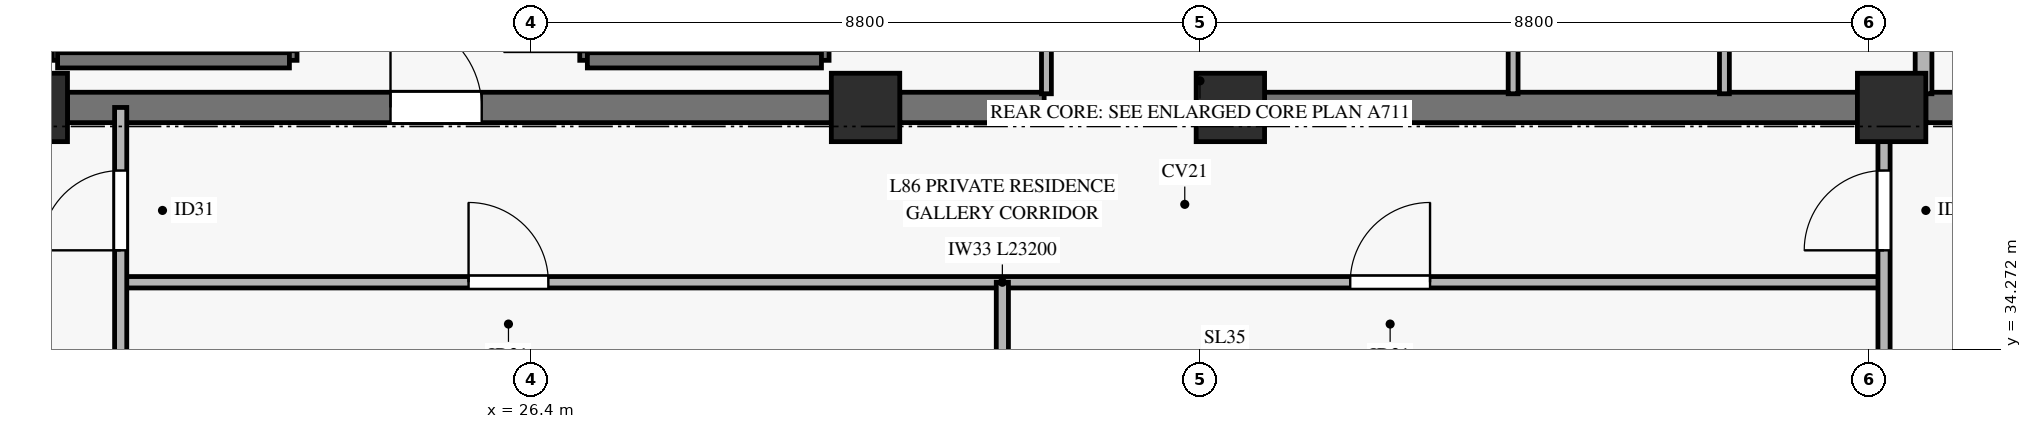
"""IFC4 building model, lengths in metres.
Left out: names, types, materials, properties, quantities, classifications, styles, units other than length and angle.
Written with IfcOpenShell. Run it as: python <this file> out.ifc"""

import sys

from ifc_helpers import new_model, si_unit, direction, frame, frame_2d, origin, origin_2d, place, context, subcontext, project, spatial, rectangle, extrude, source, transform, mapped, element, fill, save


model = new_model("IFC4")
c1 = context("Model", 3, precision=1e-05, world=origin(), true_north=direction((0.0, 1.0)))
c2 = subcontext(c1, "Body", "Model", "MODEL_VIEW")
j1 = project(units=[si_unit("LENGTHUNIT", "METRE"), si_unit("PLANEANGLEUNIT", "RADIAN")], contexts=[c1])
p1 = place(None, origin())
s1 = spatial("IfcSite", under=j1, at=p1, CompositionType="ELEMENT")
p2 = place(p1, origin())
s2 = spatial("IfcBuilding", under=s1, at=p2, CompositionType="ELEMENT")
p3 = place(p2, frame((0.0, 0.0, 332.3)))
s3 = spatial("IfcBuildingStorey", under=s2, at=p3, CompositionType="ELEMENT", Elevation=332.3)
m1 = source(origin(), c2, "Body", "SweptSolid", [
    extrude(rectangle(XDim=0.9, YDim=0.9, at=origin_2d()), origin(), (0.0, 0.0, 1.0), 3.185),
])
for number, where, z_axis, x_axis in (
    (1, (19.85, 37.45, 0.0), (0.0, 0.0, 1.0), (1.0, 0.0, 0.0)),
    (2, (30.8, 37.45, 0.0), (0.0, 0.0, 1.0), (1.0, 0.0, 0.0)),
    (3, (35.6, 37.45, 0.0), (0.0, 0.0, 1.0), (1.0, 0.0, 0.0)),
    (4, (44.3, 37.45, 0.0), (0.0, 0.0, 1.0), (1.0, 0.0, 0.0)),
):
    element("IfcColumn", number, at=place(p3, frame(where, z_axis=z_axis, x_axis=x_axis)), inside=s3, PredefinedType="PILASTER", context=c2, shape_type="MappedRepresentation", body=[
        mapped(m1, transform((0.0, 0.0, 0.0), x_axis=(1.0, 0.0, 0.0), y_axis=(0.0, 1.0, 0.0), z_axis=(0.0, 0.0, 1.0), scale=1.0)),
    ])
p4 = place(p3, frame((20.3, 37.45, 0.0), z_axis=(0.0, 0.0, 1.0), x_axis=(1.0, 0.0, 0.0)))
e5 = element("IfcWall", 5, at=p4, inside=s3, PredefinedType="SHEAR", context=c2, shape_type="SweptSolid", body=[
    extrude(rectangle(XDim=10.05, YDim=0.4, at=frame_2d((5.025, 0.0))), origin(), (0.0, 0.0, 1.0), 3.185),
])
p5 = place(p4, frame((4.25, 0.0, 0.0)))
e6 = element("IfcOpeningElement", 6, at=p5, cuts=e5, PredefinedType="OPENING", context=c2, shape_type="SweptSolid", body=[
    extrude(rectangle(XDim=1.2, YDim=2.15, at=frame_2d((0.6, 1.075))), frame((0.0, 0.21, 0.0), z_axis=(0.0, -1.0, 0.0), x_axis=(1.0, 0.0, 0.0)), (0.0, 0.0, 1.0), 0.42),
])
p6 = place(p3, frame((31.25, 37.45, 0.0), z_axis=(0.0, 0.0, 1.0), x_axis=(1.0, 0.0, 0.0)))
e7 = element("IfcWall", 7, at=p6, inside=s3, PredefinedType="SHEAR", context=c2, shape_type="SweptSolid", body=[
    extrude(rectangle(XDim=1.9, YDim=0.4, at=frame_2d((0.95, 0.0))), origin(), (0.0, 0.0, 1.0), 3.185),
])
p7 = place(p3, frame((36.05, 37.45, 0.0), z_axis=(0.0, 0.0, 1.0), x_axis=(1.0, 0.0, 0.0)))
e8 = element("IfcWall", 8, at=p7, inside=s3, PredefinedType="SHEAR", context=c2, shape_type="SweptSolid", body=[
    extrude(rectangle(XDim=7.8, YDim=0.4, at=frame_2d((3.9, 0.0))), origin(), (0.0, 0.0, 1.0), 3.185),
])
p8 = place(p3, frame((44.75, 37.45, 0.0), z_axis=(0.0, 0.0, 1.0), x_axis=(1.0, 0.0, 0.0)))
e9 = element("IfcWall", 9, at=p8, inside=s3, PredefinedType="SHEAR", context=c2, shape_type="SweptSolid", body=[
    extrude(rectangle(XDim=5.35, YDim=0.4, at=frame_2d((2.675, 0.0))), origin(), (0.0, 0.0, 1.0), 3.185),
])
p9 = place(p8, frame((0.7, 0.0, 0.0)))
e10 = element("IfcOpeningElement", 10, at=p9, cuts=e9, PredefinedType="OPENING", context=c2, shape_type="SweptSolid", body=[
    extrude(rectangle(XDim=1.2, YDim=2.15, at=frame_2d((0.6, 1.075))), frame((0.0, 0.21, 0.0), z_axis=(0.0, -1.0, 0.0), x_axis=(1.0, 0.0, 0.0)), (0.0, 0.0, 1.0), 0.42),
])
p10 = place(p3, frame((20.17, 38.07, 0.0), z_axis=(0.0, 0.0, 1.0), x_axis=(0.0, 1.0, 0.0)))
e11 = element("IfcWall", 11, at=p10, inside=s3, PredefinedType="SOLIDWALL", context=c2, shape_type="SweptSolid", body=[
    extrude(rectangle(XDim=7.25, YDim=0.14, at=frame_2d((3.625, 0.0))), origin(), (0.0, 0.0, 1.0), 3.4),
])
p11 = place(p3, frame((23.22, 38.07, 0.0), z_axis=(0.0, 0.0, 1.0), x_axis=(0.0, 1.0, 0.0)))
e12 = element("IfcWall", 12, at=p11, inside=s3, PredefinedType="SOLIDWALL", context=c2, shape_type="SweptSolid", body=[
    extrude(rectangle(XDim=7.25, YDim=0.2, at=frame_2d((3.625, 0.0))), origin(), (0.0, 0.0, 1.0), 3.4),
])
p12 = place(p11, frame((0.11, 0.0, 0.0)))
e13 = element("IfcOpeningElement", 13, at=p12, cuts=e12, PredefinedType="OPENING", context=c2, shape_type="SweptSolid", body=[
    extrude(rectangle(XDim=1.1, YDim=2.15, at=frame_2d((0.55, 1.075))), frame((0.0, 0.11, 0.0), z_axis=(0.0, -1.0, 0.0), x_axis=(1.0, 0.0, 0.0)), (0.0, 0.0, 1.0), 0.22),
])
p13 = place(p3, frame((20.17, 38.07, 0.0), z_axis=(0.0, 0.0, 1.0), x_axis=(1.0, 0.0, 0.0)))
e14 = element("IfcWall", 14, at=p13, inside=s3, PredefinedType="SOLIDWALL", context=c2, shape_type="SweptSolid", body=[
    extrude(rectangle(XDim=3.05, YDim=0.2, at=frame_2d((1.525, 0.0))), origin(), (0.0, 0.0, 1.0), 3.4),
])
p14 = place(p3, frame((27.14, 38.07, 0.0), z_axis=(0.0, 0.0, 1.0), x_axis=(0.0, 1.0, 0.0)))
e15 = element("IfcWall", 15, at=p14, inside=s3, PredefinedType="SOLIDWALL", context=c2, shape_type="SweptSolid", body=[
    extrude(rectangle(XDim=7.25, YDim=0.2, at=frame_2d((3.625, 0.0))), origin(), (0.0, 0.0, 1.0), 3.4),
])
p15 = place(p14, frame((0.11, 0.0, 0.0)))
e16 = element("IfcOpeningElement", 16, at=p15, cuts=e15, PredefinedType="OPENING", context=c2, shape_type="SweptSolid", body=[
    extrude(rectangle(XDim=1.1, YDim=2.15, at=frame_2d((0.55, 1.075))), frame((0.0, 0.11, 0.0), z_axis=(0.0, -1.0, 0.0), x_axis=(1.0, 0.0, 0.0)), (0.0, 0.0, 1.0), 0.22),
])
p16 = place(p3, frame((30.22, 38.07, 0.0), z_axis=(0.0, 0.0, 1.0), x_axis=(0.0, 1.0, 0.0)))
e17 = element("IfcWall", 17, at=p16, inside=s3, PredefinedType="SOLIDWALL", context=c2, shape_type="SweptSolid", body=[
    extrude(rectangle(XDim=7.25, YDim=0.2, at=frame_2d((3.625, 0.0))), origin(), (0.0, 0.0, 1.0), 3.4),
])
p17 = place(p3, frame((27.14, 38.07, 0.0), z_axis=(0.0, 0.0, 1.0), x_axis=(1.0, 0.0, 0.0)))
e18 = element("IfcWall", 18, at=p17, inside=s3, PredefinedType="SOLIDWALL", context=c2, shape_type="SweptSolid", body=[
    extrude(rectangle(XDim=3.08, YDim=0.2, at=frame_2d((1.54, 0.0))), origin(), (0.0, 0.0, 1.0), 3.4),
])
p18 = place(p3, frame((44.72, 37.63, 0.0), z_axis=(0.0, 0.0, 1.0), x_axis=(0.0, 1.0, 0.0)))
e19 = element("IfcWall", 19, at=p18, inside=s3, PredefinedType="SOLIDWALL", context=c2, shape_type="SweptSolid", body=[
    extrude(rectangle(XDim=7.59, YDim=0.22, at=frame_2d((3.795, 0.0))), origin(), (0.0, 0.0, 1.0), 3.185),
])
p19 = place(p3, frame((33.18, 37.63, 0.0), z_axis=(0.0, 0.0, 1.0), x_axis=(0.0, 1.0, 0.0)))
e20 = element("IfcWall", 20, at=p19, inside=s3, PredefinedType="PARTITIONING", context=c2, shape_type="SweptSolid", body=[
    extrude(rectangle(XDim=6.52, YDim=0.13, at=frame_2d((3.26, 0.0))), origin(), (0.0, 0.0, 1.0), 2.27),
])
p20 = place(p19, frame((2.27, 0.0, 0.0)))
e21 = element("IfcOpeningElement", 21, at=p20, cuts=e20, PredefinedType="OPENING", context=c2, shape_type="SweptSolid", body=[
    extrude(rectangle(XDim=0.9, YDim=2.1, at=frame_2d((0.45, 1.05))), frame((0.0, 0.075, 0.0), z_axis=(0.0, -1.0, 0.0), x_axis=(1.0, 0.0, 0.0)), (0.0, 0.0, 1.0), 0.15),
])
p21 = place(p3, frame((39.32, 37.63, 0.0), z_axis=(0.0, 0.0, 1.0), x_axis=(0.0, 1.0, 0.0)))
e22 = element("IfcWall", 22, at=p21, inside=s3, PredefinedType="PARTITIONING", context=c2, shape_type="SweptSolid", body=[
    extrude(rectangle(XDim=8.74, YDim=0.13, at=frame_2d((4.37, 0.0))), origin(), (0.0, 0.0, 1.0), 3.185),
])
p22 = place(p21, frame((4.89, 0.0, 0.0)))
e23 = element("IfcOpeningElement", 23, at=p22, cuts=e22, PredefinedType="OPENING", context=c2, shape_type="SweptSolid", body=[
    extrude(rectangle(XDim=0.9, YDim=2.1, at=frame_2d((0.45, 1.05))), frame((0.0, 0.075, 0.0), z_axis=(0.0, -1.0, 0.0), x_axis=(1.0, 0.0, 0.0)), (0.0, 0.0, 1.0), 0.15),
])
p23 = place(p3, frame((42.1, 37.63, 0.0), z_axis=(0.0, 0.0, 1.0), x_axis=(0.0, 1.0, 0.0)))
e24 = element("IfcWall", 24, at=p23, inside=s3, PredefinedType="PARTITIONING", context=c2, shape_type="SweptSolid", body=[
    extrude(rectangle(XDim=8.74, YDim=0.13, at=frame_2d((4.37, 0.0))), origin(), (0.0, 0.0, 1.0), 3.185),
])
p24 = place(p23, frame((2.17, 0.0, 0.0)))
e25 = element("IfcOpeningElement", 25, at=p24, cuts=e24, PredefinedType="OPENING", context=c2, shape_type="SweptSolid", body=[
    extrude(rectangle(XDim=0.9, YDim=2.1, at=frame_2d((0.45, 1.05))), frame((0.0, 0.075, 0.0), z_axis=(0.0, -1.0, 0.0), x_axis=(1.0, 0.0, 0.0)), (0.0, 0.0, 1.0), 0.15),
])
p25 = place(p3, frame((21.0, 35.15, 0.0), z_axis=(0.0, 0.0, 1.0), x_axis=(1.0, 0.0, 0.0)))
e26 = element("IfcWall", 26, at=p25, inside=s3, PredefinedType="PARTITIONING", context=c2, shape_type="SweptSolid", body=[
    extrude(rectangle(XDim=23.2, YDim=0.15, at=frame_2d((11.6, 0.0))), origin(), (0.0, 0.0, 1.0), 2.47),
])
p26 = place(p25, frame((4.577, 0.0, 0.0)))
e27 = element("IfcOpeningElement", 27, at=p26, cuts=e26, PredefinedType="OPENING", context=c2, shape_type="SweptSolid", body=[
    extrude(rectangle(XDim=1.05, YDim=2.15, at=frame_2d((0.525, 1.075))), frame((0.0, 0.085, 0.0), z_axis=(0.0, -1.0, 0.0), x_axis=(1.0, 0.0, 0.0)), (0.0, 0.0, 1.0), 0.17),
])
p27 = place(p25, frame((16.177, 0.0, 0.0)))
e28 = element("IfcOpeningElement", 28, at=p27, cuts=e26, PredefinedType="OPENING", context=c2, shape_type="SweptSolid", body=[
    extrude(rectangle(XDim=1.05, YDim=2.15, at=frame_2d((0.525, 1.075))), frame((0.0, 0.085, 0.0), z_axis=(0.0, -1.0, 0.0), x_axis=(1.0, 0.0, 0.0)), (0.0, 0.0, 1.0), 0.17),
])
p28 = place(p3, frame((21.0, 21.636, 0.0), z_axis=(0.0, 0.0, 1.0), x_axis=(0.0, 1.0, 0.0)))
e29 = element("IfcWall", 29, at=p28, inside=s3, PredefinedType="PARTITIONING", context=c2, shape_type="SweptSolid", body=[
    extrude(rectangle(XDim=15.814, YDim=0.16, at=frame_2d((7.907, 0.0))), origin(), (0.0, 0.0, 1.0), 2.77),
])
p29 = place(p28, frame((13.934, 0.0, 0.0)))
e30 = element("IfcOpeningElement", 30, at=p29, cuts=e29, PredefinedType="OPENING", context=c2, shape_type="SweptSolid", body=[
    extrude(rectangle(XDim=1.05, YDim=2.15, at=frame_2d((0.525, 1.075))), frame((0.0, 0.09, 0.0), z_axis=(0.0, -1.0, 0.0), x_axis=(1.0, 0.0, 0.0)), (0.0, 0.0, 1.0), 0.18),
])
p30 = place(p3, frame((32.6, 21.636, 0.0), z_axis=(0.0, 0.0, 1.0), x_axis=(0.0, 1.0, 0.0)))
e31 = element("IfcWall", 31, at=p30, inside=s3, PredefinedType="PARTITIONING", context=c2, shape_type="SweptSolid", body=[
    extrude(rectangle(XDim=13.514, YDim=0.16, at=frame_2d((6.757, 0.0))), origin(), (0.0, 0.0, 1.0), 2.77),
])
p31 = place(p3, frame((44.2, 21.636, 0.0), z_axis=(0.0, 0.0, 1.0), x_axis=(0.0, 1.0, 0.0)))
e32 = element("IfcWall", 32, at=p31, inside=s3, PredefinedType="PARTITIONING", context=c2, shape_type="SweptSolid", body=[
    extrude(rectangle(XDim=15.814, YDim=0.16, at=frame_2d((7.907, 0.0))), origin(), (0.0, 0.0, 1.0), 2.47),
])
p32 = place(p31, frame((13.934, 0.0, 0.0)))
e33 = element("IfcOpeningElement", 33, at=p32, cuts=e32, PredefinedType="OPENING", context=c2, shape_type="SweptSolid", body=[
    extrude(rectangle(XDim=1.05, YDim=2.15, at=frame_2d((0.525, 1.075))), frame((0.0, 0.09, 0.0), z_axis=(0.0, -1.0, 0.0), x_axis=(1.0, 0.0, 0.0)), (0.0, 0.0, 1.0), 0.18),
])
m2 = source(origin(), c2, "Body", "SweptSolid", [
    extrude(rectangle(XDim=1.2, YDim=2.15, at=frame_2d((0.6, 1.075))), frame((0.0, 0.025, 0.0), z_axis=(0.0, -1.0, 0.0), x_axis=(1.0, 0.0, 0.0)), (0.0, 0.0, 1.0), 0.05),
])
p33 = place(p5, origin())
e34 = element("IfcDoor", 34, at=p33, inside=s3, OperationType="SINGLE_SWING_LEFT", PredefinedType="DOOR", context=c2, shape_type="MappedRepresentation", body=[
    mapped(m2, transform((0.0, 0.0, 0.0), x_axis=(1.0, 0.0, 0.0), y_axis=(0.0, 1.0, 0.0), z_axis=(0.0, 0.0, 1.0), scale=1.0)),
])
fill(e6, e34)
m3 = source(origin(), c2, "Body", "SweptSolid", [
    extrude(rectangle(XDim=1.05, YDim=2.15, at=frame_2d((0.525, 1.075))), frame((0.0, 0.025, 0.0), z_axis=(0.0, -1.0, 0.0), x_axis=(1.0, 0.0, 0.0)), (0.0, 0.0, 1.0), 0.05),
])
p34 = place(p29, origin())
e35 = element("IfcDoor", 35, at=p34, inside=s3, OperationType="SINGLE_SWING_LEFT", PredefinedType="DOOR", context=c2, shape_type="MappedRepresentation", body=[
    mapped(m3, transform((0.0, 0.0, 0.0), x_axis=(1.0, 0.0, 0.0), y_axis=(0.0, 1.0, 0.0), z_axis=(0.0, 0.0, 1.0), scale=1.0)),
])
fill(e30, e35)
p35 = place(p26, origin())
e36 = element("IfcDoor", 36, at=p35, inside=s3, OperationType="SINGLE_SWING_LEFT", PredefinedType="DOOR", context=c2, shape_type="MappedRepresentation", body=[
    mapped(m3, transform((0.0, 0.0, 0.0), x_axis=(1.0, 0.0, 0.0), y_axis=(0.0, 1.0, 0.0), z_axis=(0.0, 0.0, 1.0), scale=1.0)),
])
fill(e27, e36)
p36 = place(p27, origin())
e37 = element("IfcDoor", 37, at=p36, inside=s3, OperationType="SINGLE_SWING_RIGHT", PredefinedType="DOOR", context=c2, shape_type="MappedRepresentation", body=[
    mapped(m3, transform((0.0, 0.0, 0.0), x_axis=(1.0, 0.0, 0.0), y_axis=(0.0, 1.0, 0.0), z_axis=(0.0, 0.0, 1.0), scale=1.0)),
])
fill(e28, e37)
p37 = place(p32, origin())
e38 = element("IfcDoor", 38, at=p37, inside=s3, OperationType="SINGLE_SWING_LEFT", PredefinedType="DOOR", context=c2, shape_type="MappedRepresentation", body=[
    mapped(m3, transform((0.0, 0.0, 0.0), x_axis=(1.0, 0.0, 0.0), y_axis=(0.0, 1.0, 0.0), z_axis=(0.0, 0.0, 1.0), scale=1.0)),
])
fill(e33, e38)
save(model, sys.argv[1])
